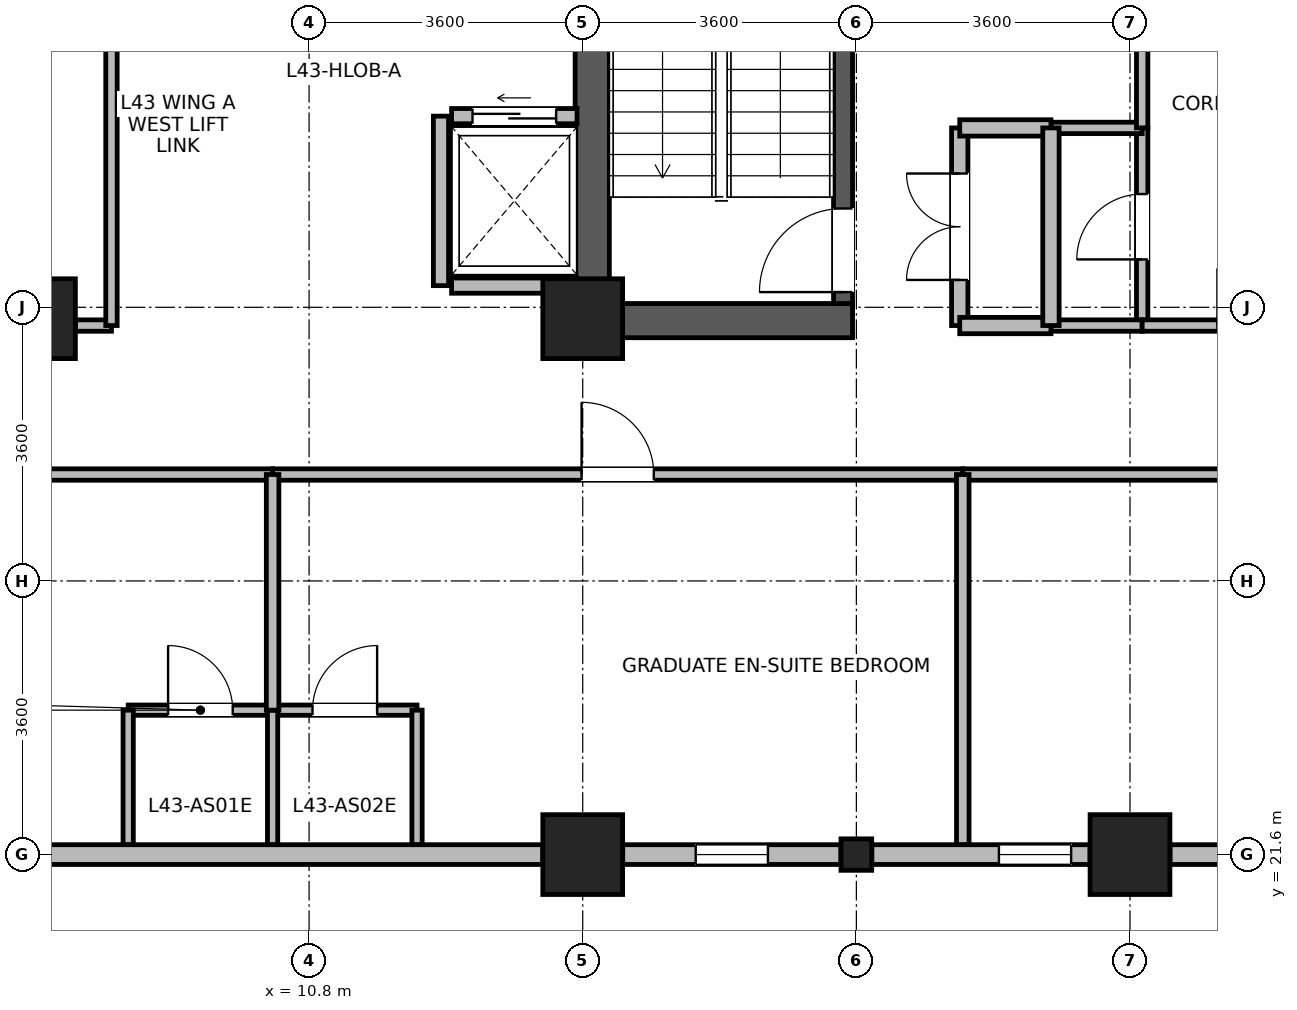
"""IFC4 building model, lengths in metres.
Left out: names, types, materials, properties, quantities, classifications, styles, units other than length and angle.
Written with IfcOpenShell. Run it as: python <this file> out.ifc"""

import sys

from ifc_helpers import new_model, si_unit, direction, frame, frame_2d, origin, origin_2d, place, context, subcontext, project, spatial, rectangle, i_section, extrude, source, transform, mapped, element, fill, save


model = new_model("IFC4")
c1 = context("Model", 3, precision=1e-05, world=origin(), true_north=direction((0.0, 1.0)))
c2 = subcontext(c1, "Body", "Model", "MODEL_VIEW")
j1 = project(units=[si_unit("LENGTHUNIT", "METRE"), si_unit("PLANEANGLEUNIT", "RADIAN")], contexts=[c1])
p1 = place(None, origin())
s1 = spatial("IfcSite", under=j1, at=p1, CompositionType="ELEMENT")
p2 = place(p1, origin())
s2 = spatial("IfcBuilding", under=s1, at=p2, CompositionType="ELEMENT")
p3 = place(p2, frame((0.0, 0.0, 169.8)))
s3 = spatial("IfcBuildingStorey", under=s2, at=p3, CompositionType="ELEMENT", Elevation=169.8)
p4 = place(p3, frame((14.525, 28.4, 0.0), z_axis=(0.0, 0.0, 1.0), x_axis=(0.0, 1.0, 0.0)))
e1 = element("IfcWall", 1, at=p4, inside=s3, PredefinedType="SHEAR", context=c2, shape_type="SweptSolid", body=[
    extrude(rectangle(XDim=7.9, YDim=0.45, at=frame_2d((3.95, 0.0))), origin(), (0.0, 0.0, 1.0), 3.46),
])
p5 = place(p3, frame((14.75, 28.625, 0.0), z_axis=(0.0, 0.0, 1.0), x_axis=(1.0, 0.0, 0.0)))
e2 = element("IfcWall", 2, at=p5, inside=s3, PredefinedType="SHEAR", context=c2, shape_type="SweptSolid", body=[
    extrude(rectangle(XDim=3.2, YDim=0.45, at=frame_2d((1.6, 0.0))), origin(), (0.0, 0.0, 1.0), 3.46),
])
p6 = place(p3, frame((17.825, 28.85, 0.0), z_axis=(0.0, 0.0, 1.0), x_axis=(0.0, 1.0, 0.0)))
e3 = element("IfcWall", 3, at=p6, inside=s3, PredefinedType="SHEAR", context=c2, shape_type="SweptSolid", body=[
    extrude(rectangle(XDim=7.0, YDim=0.25, at=frame_2d((3.5, 0.0))), origin(), (0.0, 0.0, 1.0), 3.46),
])
p7 = place(p6, frame((0.15, 0.0, 0.0)))
e4 = element("IfcOpeningElement", 4, at=p7, cuts=e3, PredefinedType="OPENING", context=c2, shape_type="SweptSolid", body=[
    extrude(rectangle(XDim=1.1, YDim=2.08, at=frame_2d((0.55, 1.04))), frame((0.0, 0.135, 0.0), z_axis=(0.0, -1.0, 0.0), x_axis=(1.0, 0.0, 0.0)), (0.0, 0.0, 1.0), 0.27),
])
m1 = source(origin(), c2, "Body", "SweptSolid", [
    extrude(rectangle(XDim=1.05, YDim=1.05, at=origin_2d()), origin(), (0.0, 0.0, 1.0), 3.7),
])
for number, where, z_axis, x_axis in (
    (5, (7.2, 28.65, 0.0), (0.0, 0.0, 1.0), (1.0, 0.0, 0.0)),
    (6, (14.4, 21.6, 0.0), (0.0, 0.0, 1.0), (1.0, 0.0, 0.0)),
    (7, (14.4, 28.65, 0.0), (0.0, 0.0, 1.0), (1.0, 0.0, 0.0)),
    (8, (21.6, 21.6, 0.0), (0.0, 0.0, 1.0), (1.0, 0.0, 0.0)),
):
    element("IfcColumn", number, at=place(p3, frame(where, z_axis=z_axis, x_axis=x_axis)), inside=s3, PredefinedType="COLUMN", context=c2, shape_type="MappedRepresentation", body=[
        mapped(m1, transform((0.0, 0.0, 0.0), x_axis=(1.0, 0.0, 0.0), y_axis=(0.0, 1.0, 0.0), z_axis=(0.0, 0.0, 1.0), scale=1.0)),
    ])
m2 = source(origin(), c2, "Body", "SweptSolid", [
    extrude(i_section(OverallWidth=0.404, OverallDepth=0.414, WebThickness=0.021, FlangeThickness=0.028, FilletRadius=0.015, at=origin_2d()), origin(), (0.0, 0.0, 1.0), 3.7),
])
p8 = place(p3, frame((18.0, 21.6, 0.0), z_axis=(0.0, 0.0, 1.0), x_axis=(1.0, 0.0, 0.0)))
e9 = element("IfcColumn", 9, at=p8, inside=s3, PredefinedType="COLUMN", context=c2, shape_type="MappedRepresentation", body=[
    mapped(m2, transform((0.0, 0.0, 0.0), x_axis=(1.0, 0.0, 0.0), y_axis=(0.0, 1.0, 0.0), z_axis=(0.0, 0.0, 1.0), scale=1.0)),
])
p9 = place(p3, frame((13.874, 21.6, 0.0), z_axis=(0.0, 0.0, 1.0), x_axis=(-1.0, 0.0, 0.0)))
e10 = element("IfcWall", 10, at=p9, inside=s3, PredefinedType="STANDARD", context=c2, shape_type="SweptSolid", body=[
    extrude(rectangle(XDim=13.337, YDim=0.26, at=frame_2d((6.668, 0.0))), origin(), (0.0, 0.0, 1.0), 3.44),
])
p10 = place(p9, frame((7.586, 0.0, 0.85)))
e11 = element("IfcOpeningElement", 11, at=p10, cuts=e10, PredefinedType="OPENING", context=c2, shape_type="SweptSolid", body=[
    extrude(rectangle(XDim=1.5, YDim=1.85, at=frame_2d((0.75, 0.925))), frame((0.0, 0.14, 0.0), z_axis=(0.0, -1.0, 0.0), x_axis=(1.0, 0.0, 0.0)), (0.0, 0.0, 1.0), 0.28),
])
p11 = place(p9, frame((10.92, 0.0, 0.85)))
e12 = element("IfcOpeningElement", 12, at=p11, cuts=e10, PredefinedType="OPENING", context=c2, shape_type="SweptSolid", body=[
    extrude(rectangle(XDim=1.5, YDim=1.85, at=frame_2d((0.75, 0.925))), frame((0.0, 0.14, 0.0), z_axis=(0.0, -1.0, 0.0), x_axis=(1.0, 0.0, 0.0)), (0.0, 0.0, 1.0), 0.28),
])
p12 = place(p3, frame((17.797, 21.6, 0.0), z_axis=(0.0, 0.0, 1.0), x_axis=(-1.0, 0.0, 0.0)))
e13 = element("IfcWall", 13, at=p12, inside=s3, PredefinedType="STANDARD", context=c2, shape_type="SweptSolid", body=[
    extrude(rectangle(XDim=2.871, YDim=0.26, at=frame_2d((1.436, 0.0))), origin(), (0.0, 0.0, 1.0), 2.99),
])
p13 = place(p12, frame((0.96, 0.0, 0.85)))
e14 = element("IfcOpeningElement", 14, at=p13, cuts=e13, PredefinedType="OPENING", context=c2, shape_type="SweptSolid", body=[
    extrude(rectangle(XDim=0.95, YDim=1.75, at=frame_2d((0.475, 0.875))), frame((0.0, 0.14, 0.0), z_axis=(0.0, -1.0, 0.0), x_axis=(1.0, 0.0, 0.0)), (0.0, 0.0, 1.0), 0.28),
])
p14 = place(p3, frame((21.074, 21.6, 0.0), z_axis=(0.0, 0.0, 1.0), x_axis=(-1.0, 0.0, 0.0)))
e15 = element("IfcWall", 15, at=p14, inside=s3, PredefinedType="STANDARD", context=c2, shape_type="SweptSolid", body=[
    extrude(rectangle(XDim=2.871, YDim=0.26, at=frame_2d((1.436, 0.0))), origin(), (0.0, 0.0, 1.0), 2.99),
])
p15 = place(p14, frame((0.249, 0.0, 0.85)))
e16 = element("IfcOpeningElement", 16, at=p15, cuts=e15, PredefinedType="OPENING", context=c2, shape_type="SweptSolid", body=[
    extrude(rectangle(XDim=0.95, YDim=1.75, at=frame_2d((0.475, 0.875))), frame((0.0, 0.14, 0.0), z_axis=(0.0, -1.0, 0.0), x_axis=(1.0, 0.0, 0.0)), (0.0, 0.0, 1.0), 0.28),
])
p16 = place(p3, frame((24.997, 21.6, 0.0), z_axis=(0.0, 0.0, 1.0), x_axis=(-1.0, 0.0, 0.0)))
e17 = element("IfcWall", 17, at=p16, inside=s3, PredefinedType="STANDARD", context=c2, shape_type="SweptSolid", body=[
    extrude(rectangle(XDim=2.871, YDim=0.26, at=frame_2d((1.436, 0.0))), origin(), (0.0, 0.0, 1.0), 2.99),
])
p17 = place(p16, frame((0.96, 0.0, 0.85)))
e18 = element("IfcOpeningElement", 18, at=p17, cuts=e17, PredefinedType="OPENING", context=c2, shape_type="SweptSolid", body=[
    extrude(rectangle(XDim=0.95, YDim=1.75, at=frame_2d((0.475, 0.875))), frame((0.0, 0.14, 0.0), z_axis=(0.0, -1.0, 0.0), x_axis=(1.0, 0.0, 0.0)), (0.0, 0.0, 1.0), 0.28),
])
p18 = place(p3, frame((12.675, 29.085, 0.0), z_axis=(0.0, 0.0, 1.0), x_axis=(1.0, 0.0, 0.0)))
e19 = element("IfcWall", 19, at=p18, inside=s3, PredefinedType="PARTITIONING", context=c2, shape_type="SweptSolid", body=[
    extrude(rectangle(XDim=1.65, YDim=0.2, at=frame_2d((0.825, 0.0))), origin(), (0.0, 0.0, 1.0), 3.44),
])
p19 = place(p3, frame((12.675, 31.315, 0.0), z_axis=(0.0, 0.0, 1.0), x_axis=(1.0, 0.0, 0.0)))
e20 = element("IfcWall", 20, at=p19, inside=s3, PredefinedType="PARTITIONING", context=c2, shape_type="SweptSolid", body=[
    extrude(rectangle(XDim=1.65, YDim=0.2, at=frame_2d((0.825, 0.0))), origin(), (0.0, 0.0, 1.0), 3.44),
])
p20 = place(p19, frame((0.275, 0.0, 0.0)))
e21 = element("IfcOpeningElement", 21, at=p20, cuts=e20, PredefinedType="OPENING", context=c2, shape_type="SweptSolid", body=[
    extrude(rectangle(XDim=1.1, YDim=2.12, at=frame_2d((0.55, 1.06))), frame((0.0, 0.11, 0.0), z_axis=(0.0, -1.0, 0.0), x_axis=(1.0, 0.0, 0.0)), (0.0, 0.0, 1.0), 0.22),
])
p21 = place(p3, frame((12.535, 29.085, 0.0), z_axis=(0.0, 0.0, 1.0), x_axis=(0.0, 1.0, 0.0)))
e22 = element("IfcWall", 22, at=p21, inside=s3, PredefinedType="PARTITIONING", context=c2, shape_type="SweptSolid", body=[
    extrude(rectangle(XDim=2.23, YDim=0.2, at=frame_2d((1.115, 0.0))), origin(), (0.0, 0.0, 1.0), 3.44),
])
p22 = place(p3, frame((8.42, 23.5, 0.0), z_axis=(0.0, 0.0, 1.0), x_axis=(1.0, 0.0, 0.0)))
e23 = element("IfcWall", 23, at=p22, inside=s3, PredefinedType="PARTITIONING", context=c2, shape_type="SweptSolid", body=[
    extrude(rectangle(XDim=1.9, YDim=0.135, at=frame_2d((0.95, 0.0))), origin(), (0.0, 0.0, 1.0), 3.44),
])
p23 = place(p22, frame((0.525, 0.0, 0.0)))
e24 = element("IfcOpeningElement", 24, at=p23, cuts=e23, PredefinedType="OPENING", context=c2, shape_type="SweptSolid", body=[
    extrude(rectangle(XDim=0.85, YDim=2.04, at=frame_2d((0.425, 1.02))), frame((0.0, 0.078, 0.0), z_axis=(0.0, -1.0, 0.0), x_axis=(1.0, 0.0, 0.0)), (0.0, 0.0, 1.0), 0.155),
])
p24 = place(p3, frame((10.32, 23.5, 0.0), z_axis=(0.0, 0.0, 1.0), x_axis=(1.0, 0.0, 0.0)))
e25 = element("IfcWall", 25, at=p24, inside=s3, PredefinedType="PARTITIONING", context=c2, shape_type="SweptSolid", body=[
    extrude(rectangle(XDim=1.9, YDim=0.135, at=frame_2d((0.95, 0.0))), origin(), (0.0, 0.0, 1.0), 3.44),
])
p25 = place(p24, frame((0.525, 0.0, 0.0)))
e26 = element("IfcOpeningElement", 26, at=p25, cuts=e25, PredefinedType="OPENING", context=c2, shape_type="SweptSolid", body=[
    extrude(rectangle(XDim=0.85, YDim=2.04, at=frame_2d((0.425, 1.02))), frame((0.0, 0.078, 0.0), z_axis=(0.0, -1.0, 0.0), x_axis=(1.0, 0.0, 0.0)), (0.0, 0.0, 1.0), 0.155),
])
for number, where, z_axis, x_axis in (
    (27, (8.42, 21.732, 0.0), (0.0, 0.0, 1.0), (0.0, 1.0, 0.0)),
    (28, (10.32, 21.732, 0.0), (0.0, 0.0, 1.0), (0.0, 1.0, 0.0)),
    (29, (12.22, 21.732, 0.0), (0.0, 0.0, 1.0), (0.0, 1.0, 0.0)),
):
    element("IfcWall", number, at=place(p3, frame(where, z_axis=z_axis, x_axis=x_axis)), inside=s3, PredefinedType="PARTITIONING", context=c2, shape_type="SweptSolid", body=[
        extrude(rectangle(XDim=1.768, YDim=0.135, at=frame_2d((0.884, 0.0))), origin(), (0.0, 0.0, 1.0), 3.44),
    ])
p26 = place(p3, frame((0.52, 26.6, 0.0), z_axis=(0.0, 0.0, 1.0), x_axis=(1.0, 0.0, 0.0)))
e30 = element("IfcWall", 30, at=p26, inside=s3, PredefinedType="PARTITIONING", context=c2, shape_type="SweptSolid", body=[
    extrude(rectangle(XDim=9.8, YDim=0.15, at=frame_2d((4.9, 0.0))), origin(), (0.0, 0.0, 1.0), 3.44),
])
p27 = place(p26, frame((4.425, 0.0, 0.0)))
e31 = element("IfcOpeningElement", 31, at=p27, cuts=e30, PredefinedType="OPENING", context=c2, shape_type="SweptSolid", body=[
    extrude(rectangle(XDim=0.95, YDim=2.1, at=frame_2d((0.475, 1.05))), frame((0.0, 0.085, 0.0), z_axis=(0.0, -1.0, 0.0), x_axis=(1.0, 0.0, 0.0)), (0.0, 0.0, 1.0), 0.17),
])
p28 = place(p3, frame((10.32, 26.6, 0.0), z_axis=(0.0, 0.0, 1.0), x_axis=(1.0, 0.0, 0.0)))
e32 = element("IfcWall", 32, at=p28, inside=s3, PredefinedType="PARTITIONING", context=c2, shape_type="SweptSolid", body=[
    extrude(rectangle(XDim=9.08, YDim=0.15, at=frame_2d((4.54, 0.0))), origin(), (0.0, 0.0, 1.0), 3.44),
])
p29 = place(p28, frame((4.065, 0.0, 0.0)))
e33 = element("IfcOpeningElement", 33, at=p29, cuts=e32, PredefinedType="OPENING", context=c2, shape_type="SweptSolid", body=[
    extrude(rectangle(XDim=0.95, YDim=2.1, at=frame_2d((0.475, 1.05))), frame((0.0, 0.085, 0.0), z_axis=(0.0, -1.0, 0.0), x_axis=(1.0, 0.0, 0.0)), (0.0, 0.0, 1.0), 0.17),
])
p30 = place(p3, frame((19.4, 26.6, 0.0), z_axis=(0.0, 0.0, 1.0), x_axis=(1.0, 0.0, 0.0)))
e34 = element("IfcWall", 34, at=p30, inside=s3, PredefinedType="PARTITIONING", context=c2, shape_type="SweptSolid", body=[
    extrude(rectangle(XDim=8.24, YDim=0.15, at=frame_2d((4.12, 0.0))), origin(), (0.0, 0.0, 1.0), 3.44),
])
p31 = place(p30, frame((3.47, 0.0, 0.0)))
e35 = element("IfcOpeningElement", 35, at=p31, cuts=e34, PredefinedType="OPENING", context=c2, shape_type="SweptSolid", body=[
    extrude(rectangle(XDim=1.3, YDim=2.12, at=frame_2d((0.65, 1.06))), frame((0.0, 0.085, 0.0), z_axis=(0.0, -1.0, 0.0), x_axis=(1.0, 0.0, 0.0)), (0.0, 0.0, 1.0), 0.17),
])
p32 = place(p3, frame((7.725, 28.56, 0.0), z_axis=(0.0, 0.0, 1.0), x_axis=(1.0, 0.0, 0.0)))
e36 = element("IfcWall", 36, at=p32, inside=s3, PredefinedType="PARTITIONING", context=c2, shape_type="SweptSolid", body=[
    extrude(rectangle(XDim=0.475, YDim=0.15, at=frame_2d((0.237, 0.0))), origin(), (0.0, 0.0, 1.0), 2.84),
])
p33 = place(p3, frame((8.2, 28.56, 0.0), z_axis=(0.0, 0.0, 1.0), x_axis=(0.0, 1.0, 0.0)))
e37 = element("IfcWall", 37, at=p33, inside=s3, PredefinedType="PARTITIONING", context=c2, shape_type="SweptSolid", body=[
    extrude(rectangle(XDim=3.84, YDim=0.15, at=frame_2d((1.92, 0.0))), origin(), (0.0, 0.0, 1.0), 3.44),
])
p34 = place(p3, frame((19.36, 28.56, 0.0), z_axis=(0.0, 0.0, 1.0), x_axis=(0.0, 1.0, 0.0)))
e38 = element("IfcWall", 38, at=p34, inside=s3, PredefinedType="PARTITIONING", context=c2, shape_type="SweptSolid", body=[
    extrude(rectangle(XDim=2.6, YDim=0.215, at=frame_2d((1.3, 0.0))), origin(), (0.0, 0.0, 1.0), 3.44),
])
p35 = place(p34, frame((0.6, 0.0, 0.0)))
e39 = element("IfcOpeningElement", 39, at=p35, cuts=e38, PredefinedType="OPENING", context=c2, shape_type="SweptSolid", body=[
    extrude(rectangle(XDim=1.4, YDim=2.15, at=frame_2d((0.7, 1.075))), frame((0.0, 0.118, 0.0), z_axis=(0.0, -1.0, 0.0), x_axis=(1.0, 0.0, 0.0)), (0.0, 0.0, 1.0), 0.235),
])
p36 = place(p3, frame((21.76, 28.56, 0.0), z_axis=(0.0, 0.0, 1.0), x_axis=(0.0, 1.0, 0.0)))
e40 = element("IfcWall", 40, at=p36, inside=s3, PredefinedType="PARTITIONING", context=c2, shape_type="SweptSolid", body=[
    extrude(rectangle(XDim=2.6, YDim=0.15, at=frame_2d((1.3, 0.0))), origin(), (0.0, 0.0, 1.0), 3.44),
])
p37 = place(p36, frame((0.87, 0.0, 0.0)))
e41 = element("IfcOpeningElement", 41, at=p37, cuts=e40, PredefinedType="OPENING", context=c2, shape_type="SweptSolid", body=[
    extrude(rectangle(XDim=0.86, YDim=2.02, at=frame_2d((0.43, 1.01))), frame((0.0, 0.085, 0.0), z_axis=(0.0, -1.0, 0.0), x_axis=(1.0, 0.0, 0.0)), (0.0, 0.0, 1.0), 0.17),
])
p38 = place(p3, frame((20.56, 28.56, 0.0), z_axis=(0.0, 0.0, 1.0), x_axis=(1.0, 0.0, 0.0)))
e42 = element("IfcWall", 42, at=p38, inside=s3, PredefinedType="PARTITIONING", context=c2, shape_type="SweptSolid", body=[
    extrude(rectangle(XDim=1.2, YDim=0.15, at=frame_2d((0.6, 0.0))), origin(), (0.0, 0.0, 1.0), 2.44),
])
p39 = place(p3, frame((20.56, 31.16, 0.0), z_axis=(0.0, 0.0, 1.0), x_axis=(1.0, 0.0, 0.0)))
e43 = element("IfcWall", 43, at=p39, inside=s3, PredefinedType="PARTITIONING", context=c2, shape_type="SweptSolid", body=[
    extrude(rectangle(XDim=1.2, YDim=0.15, at=frame_2d((0.6, 0.0))), origin(), (0.0, 0.0, 1.0), 3.44),
])
p40 = place(p3, frame((19.36, 28.56, 0.0), z_axis=(0.0, 0.0, 1.0), x_axis=(1.0, 0.0, 0.0)))
e44 = element("IfcWall", 44, at=p40, inside=s3, PredefinedType="PARTITIONING", context=c2, shape_type="SweptSolid", body=[
    extrude(rectangle(XDim=1.2, YDim=0.215, at=frame_2d((0.6, 0.0))), origin(), (0.0, 0.0, 1.0), 2.44),
])
p41 = place(p3, frame((19.36, 31.16, 0.0), z_axis=(0.0, 0.0, 1.0), x_axis=(1.0, 0.0, 0.0)))
e45 = element("IfcWall", 45, at=p41, inside=s3, PredefinedType="PARTITIONING", context=c2, shape_type="SweptSolid", body=[
    extrude(rectangle(XDim=1.2, YDim=0.215, at=frame_2d((0.6, 0.0))), origin(), (0.0, 0.0, 1.0), 3.44),
])
p42 = place(p3, frame((19.4, 21.732, 0.0), z_axis=(0.0, 0.0, 1.0), x_axis=(0.0, 1.0, 0.0)))
e46 = element("IfcWall", 46, at=p42, inside=s3, PredefinedType="PARTITIONING", context=c2, shape_type="SweptSolid", body=[
    extrude(rectangle(XDim=4.868, YDim=0.165, at=frame_2d((2.434, 0.0))), origin(), (0.0, 0.0, 1.0), 3.44),
])
p43 = place(p3, frame((21.76, 28.56, 0.0), z_axis=(0.0, 0.0, 1.0), x_axis=(1.0, 0.0, 0.0)))
e47 = element("IfcWall", 47, at=p43, inside=s3, PredefinedType="PARTITIONING", context=c2, shape_type="SweptSolid", body=[
    extrude(rectangle(XDim=3.48, YDim=0.15, at=frame_2d((1.74, 0.0))), origin(), (0.0, 0.0, 1.0), 2.44),
])
p44 = place(p43, frame((0.99, 0.0, 0.0)))
e48 = element("IfcOpeningElement", 48, at=p44, cuts=e47, PredefinedType="OPENING", context=c2, shape_type="SweptSolid", body=[
    extrude(rectangle(XDim=1.5, YDim=2.1, at=frame_2d((0.75, 1.05))), frame((0.0, 0.085, 0.0), z_axis=(0.0, -1.0, 0.0), x_axis=(1.0, 0.0, 0.0)), (0.0, 0.0, 1.0), 0.17),
])
p45 = place(p3, frame((10.32, 23.5, 0.0), z_axis=(0.0, 0.0, 1.0), x_axis=(0.0, 1.0, 0.0)))
e49 = element("IfcWall", 49, at=p45, inside=s3, PredefinedType="PARTITIONING", context=c2, shape_type="SweptSolid", body=[
    extrude(rectangle(XDim=3.1, YDim=0.165, at=frame_2d((1.55, 0.0))), origin(), (0.0, 0.0, 1.0), 3.44),
])
p46 = place(p3, frame((20.56, 28.56, 0.0), z_axis=(0.0, 0.0, 1.0), x_axis=(0.0, 1.0, 0.0)))
e50 = element("IfcWall", 50, at=p46, inside=s3, PredefinedType="PARTITIONING", context=c2, shape_type="SweptSolid", body=[
    extrude(rectangle(XDim=2.6, YDim=0.215, at=frame_2d((1.3, 0.0))), origin(), (0.0, 0.0, 1.0), 3.44),
])
p47 = place(p3, frame((21.76, 31.16, 0.0), z_axis=(0.0, 0.0, 1.0), x_axis=(0.0, 1.0, 0.0)))
e51 = element("IfcWall", 51, at=p47, inside=s3, PredefinedType="PARTITIONING", context=c2, shape_type="SweptSolid", body=[
    extrude(rectangle(XDim=2.0, YDim=0.15, at=frame_2d((1.0, 0.0))), origin(), (0.0, 0.0, 1.0), 3.44),
])
p48 = place(p13, origin())
e52 = element("IfcWindow", 52, at=p48, inside=s3, PartitioningType="SINGLE_PANEL", PredefinedType="WINDOW", context=c2, shape_type="SweptSolid", body=[
    extrude(rectangle(XDim=0.95, YDim=1.75, at=frame_2d((0.475, 0.875))), frame((0.0, 0.03, 0.0), z_axis=(0.0, -1.0, 0.0), x_axis=(1.0, 0.0, 0.0)), (0.0, 0.0, 1.0), 0.06),
])
fill(e14, e52)
p49 = place(p15, origin())
e53 = element("IfcWindow", 53, at=p49, inside=s3, PartitioningType="SINGLE_PANEL", PredefinedType="WINDOW", context=c2, shape_type="SweptSolid", body=[
    extrude(rectangle(XDim=0.95, YDim=1.75, at=frame_2d((0.475, 0.875))), frame((0.0, 0.03, 0.0), z_axis=(0.0, -1.0, 0.0), x_axis=(1.0, 0.0, 0.0)), (0.0, 0.0, 1.0), 0.06),
])
fill(e16, e53)
p50 = place(p7, origin())
e54 = element("IfcDoor", 54, at=p50, inside=s3, OperationType="SINGLE_SWING_LEFT", PredefinedType="DOOR", context=c2, shape_type="SweptSolid", body=[
    extrude(rectangle(XDim=1.1, YDim=2.08, at=frame_2d((0.55, 1.04))), frame((0.0, 0.025, 0.0), z_axis=(0.0, -1.0, 0.0), x_axis=(1.0, 0.0, 0.0)), (0.0, 0.0, 1.0), 0.05),
])
fill(e4, e54)
p51 = place(p20, origin())
e55 = element("IfcDoor", 55, at=p51, inside=s3, OperationType="SLIDING_TO_LEFT", PredefinedType="DOOR", context=c2, shape_type="SweptSolid", body=[
    extrude(rectangle(XDim=1.1, YDim=2.12, at=frame_2d((0.55, 1.06))), frame((0.0, 0.025, 0.0), z_axis=(0.0, -1.0, 0.0), x_axis=(1.0, 0.0, 0.0)), (0.0, 0.0, 1.0), 0.05),
])
fill(e21, e55)
p52 = place(p23, origin())
e56 = element("IfcDoor", 56, at=p52, inside=s3, OperationType="SINGLE_SWING_LEFT", PredefinedType="DOOR", context=c2, shape_type="SweptSolid", body=[
    extrude(rectangle(XDim=0.85, YDim=2.04, at=frame_2d((0.425, 1.02))), frame((0.0, 0.025, 0.0), z_axis=(0.0, -1.0, 0.0), x_axis=(1.0, 0.0, 0.0)), (0.0, 0.0, 1.0), 0.05),
])
fill(e24, e56)
p53 = place(p25, origin())
e57 = element("IfcDoor", 57, at=p53, inside=s3, OperationType="SINGLE_SWING_RIGHT", PredefinedType="DOOR", context=c2, shape_type="SweptSolid", body=[
    extrude(rectangle(XDim=0.85, YDim=2.04, at=frame_2d((0.425, 1.02))), frame((0.0, 0.025, 0.0), z_axis=(0.0, -1.0, 0.0), x_axis=(1.0, 0.0, 0.0)), (0.0, 0.0, 1.0), 0.05),
])
fill(e26, e57)
p54 = place(p29, origin())
e58 = element("IfcDoor", 58, at=p54, inside=s3, OperationType="SINGLE_SWING_LEFT", PredefinedType="DOOR", context=c2, shape_type="SweptSolid", body=[
    extrude(rectangle(XDim=0.95, YDim=2.1, at=frame_2d((0.475, 1.05))), frame((0.0, 0.025, 0.0), z_axis=(0.0, -1.0, 0.0), x_axis=(1.0, 0.0, 0.0)), (0.0, 0.0, 1.0), 0.05),
])
fill(e33, e58)
p55 = place(p35, origin())
e59 = element("IfcDoor", 59, at=p55, inside=s3, OperationType="DOUBLE_DOOR_SINGLE_SWING", PredefinedType="DOOR", context=c2, shape_type="SweptSolid", body=[
    extrude(rectangle(XDim=1.4, YDim=2.15, at=frame_2d((0.7, 1.075))), frame((0.0, 0.025, 0.0), z_axis=(0.0, -1.0, 0.0), x_axis=(1.0, 0.0, 0.0)), (0.0, 0.0, 1.0), 0.05),
])
fill(e39, e59)
p56 = place(p37, origin())
e60 = element("IfcDoor", 60, at=p56, inside=s3, OperationType="SINGLE_SWING_LEFT", PredefinedType="DOOR", context=c2, shape_type="SweptSolid", body=[
    extrude(rectangle(XDim=0.86, YDim=2.02, at=frame_2d((0.43, 1.01))), frame((0.0, 0.025, 0.0), z_axis=(0.0, -1.0, 0.0), x_axis=(1.0, 0.0, 0.0)), (0.0, 0.0, 1.0), 0.05),
])
fill(e41, e60)
save(model, sys.argv[1])
